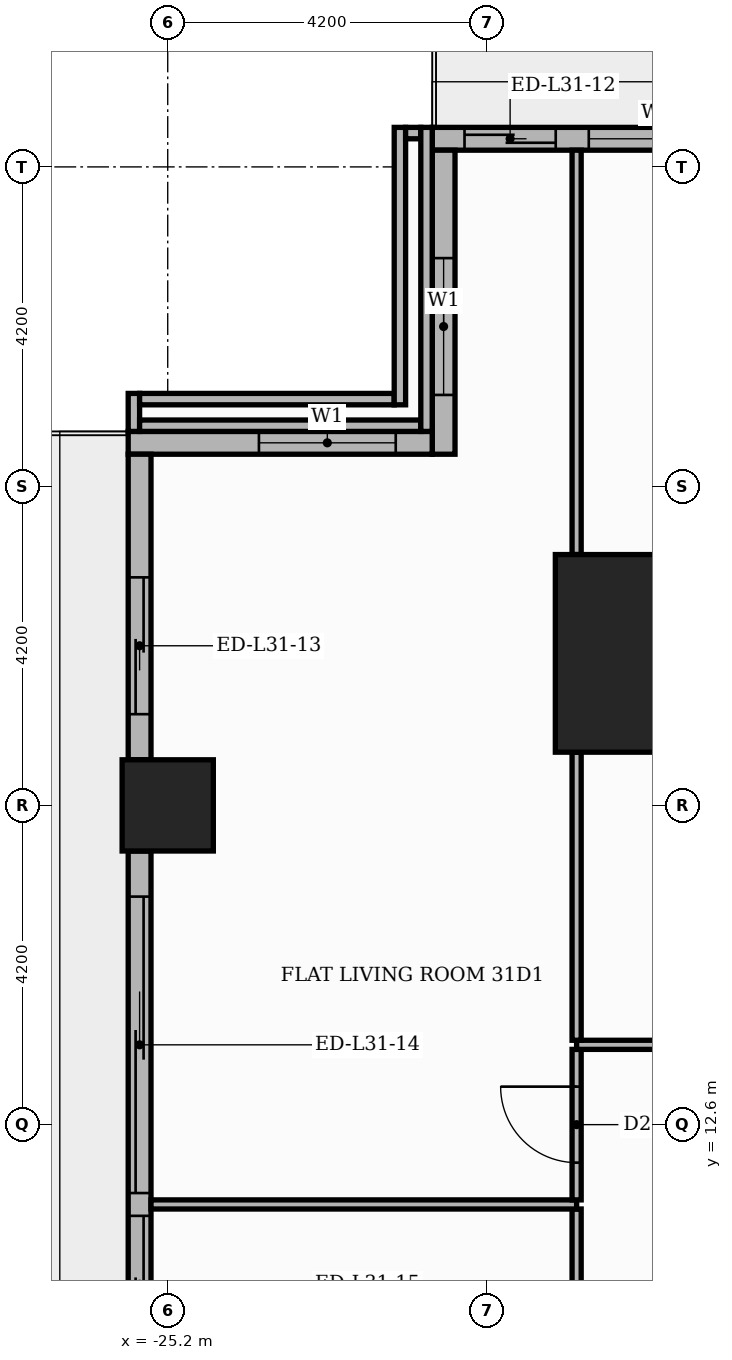
"""IFC4 building model, lengths in metres.
Left out: names, types, materials, properties, quantities, classifications, styles, units other than length and angle.
Written with IfcOpenShell. Run it as: python <this file> out.ifc"""

import sys

from ifc_helpers import new_model, si_unit, direction, frame, frame_2d, origin, origin_2d, place, context, subcontext, project, spatial, rectangle, extrude, element, fill, save


model = new_model("IFC4")
c1 = context("Model", 3, precision=1e-05, world=origin(), true_north=direction((0.0, 1.0)))
c2 = subcontext(c1, "Body", "Model", "MODEL_VIEW")
j1 = project(units=[si_unit("LENGTHUNIT", "METRE"), si_unit("PLANEANGLEUNIT", "RADIAN")], contexts=[c1])
p1 = place(None, origin())
s1 = spatial("IfcSite", under=j1, at=p1, CompositionType="ELEMENT")
p2 = place(p1, origin())
s2 = spatial("IfcBuilding", under=s1, at=p2, CompositionType="ELEMENT")
p3 = place(p2, frame((0.0, 0.0, 133.8)))
s3 = spatial("IfcBuildingStorey", under=s2, at=p3, CompositionType="ELEMENT", Elevation=133.8)
p4 = place(p3, frame((-18.8, 18.8, 0.0), z_axis=(0.0, 0.0, 1.0), x_axis=(1.0, 0.0, 0.0)))
e1 = element("IfcColumn", 1, at=p4, inside=s3, PredefinedType="COLUMN", context=c2, shape_type="SweptSolid", body=[
    extrude(rectangle(XDim=2.6, YDim=2.6, at=origin_2d()), origin(), (0.0, 0.0, 1.0), 3.9),
])
p5 = place(p3, frame((-25.2, 16.8, 0.0), z_axis=(0.0, 0.0, 1.0), x_axis=(1.0, 0.0, 0.0)))
e2 = element("IfcColumn", 2, at=p5, inside=s3, PredefinedType="COLUMN", context=c2, shape_type="SweptSolid", body=[
    extrude(rectangle(XDim=1.2, YDim=1.2, at=origin_2d()), origin(), (0.0, 0.0, 1.0), 3.9),
])
p6 = place(p3, frame((-17.4, 25.57, 0.0), z_axis=(0.0, 0.0, 1.0), x_axis=(-1.0, 0.0, 0.0)))
e3 = element("IfcWall", 3, at=p6, inside=s3, PredefinedType="STANDARD", context=c2, shape_type="SweptSolid", body=[
    extrude(rectangle(XDim=4.32, YDim=0.3, at=frame_2d((2.16, 0.0))), origin(), (0.0, 0.0, 1.0), 3.48),
])
p7 = place(p6, frame((2.695, 0.0, 0.0)))
e4 = element("IfcOpeningElement", 4, at=p7, cuts=e3, PredefinedType="OPENING", context=c2, shape_type="SweptSolid", body=[
    extrude(rectangle(XDim=1.2, YDim=2.4, at=frame_2d((0.6, 1.2))), frame((0.0, 0.16, 0.0), z_axis=(0.0, -1.0, 0.0), x_axis=(1.0, 0.0, 0.0)), (0.0, 0.0, 1.0), 0.32),
])
p8 = place(p6, frame((0.46, 0.0, 0.9)))
e5 = element("IfcOpeningElement", 5, at=p8, cuts=e3, PredefinedType="OPENING", context=c2, shape_type="SweptSolid", body=[
    extrude(rectangle(XDim=1.8, YDim=2.1, at=frame_2d((0.9, 1.05))), frame((0.0, 0.16, 0.0), z_axis=(0.0, -1.0, 0.0), x_axis=(1.0, 0.0, 0.0)), (0.0, 0.0, 1.0), 0.32),
])
p9 = place(p3, frame((-21.57, 25.42, 0.0), z_axis=(0.0, 0.0, 1.0), x_axis=(0.0, -1.0, 0.0)))
e6 = element("IfcWall", 6, at=p9, inside=s3, PredefinedType="STANDARD", context=c2, shape_type="SweptSolid", body=[
    extrude(rectangle(XDim=4.0, YDim=0.3, at=frame_2d((2.0, 0.0))), origin(), (0.0, 0.0, 1.0), 3.48),
])
p10 = place(p9, frame((1.42, 0.0, 0.9)))
e7 = element("IfcOpeningElement", 7, at=p10, cuts=e6, PredefinedType="OPENING", context=c2, shape_type="SweptSolid", body=[
    extrude(rectangle(XDim=1.8, YDim=2.1, at=frame_2d((0.9, 1.05))), frame((0.0, 0.16, 0.0), z_axis=(0.0, -1.0, 0.0), x_axis=(1.0, 0.0, 0.0)), (0.0, 0.0, 1.0), 0.32),
])
p11 = place(p3, frame((-21.72, 21.57, 0.0), z_axis=(0.0, 0.0, 1.0), x_axis=(-1.0, 0.0, 0.0)))
e8 = element("IfcWall", 8, at=p11, inside=s3, PredefinedType="STANDARD", context=c2, shape_type="SweptSolid", body=[
    extrude(rectangle(XDim=4.0, YDim=0.3, at=frame_2d((2.0, 0.0))), origin(), (0.0, 0.0, 1.0), 3.48),
])
p12 = place(p11, frame((0.48, 0.0, 0.9)))
e9 = element("IfcOpeningElement", 9, at=p12, cuts=e8, PredefinedType="OPENING", context=c2, shape_type="SweptSolid", body=[
    extrude(rectangle(XDim=1.8, YDim=2.1, at=frame_2d((0.9, 1.05))), frame((0.0, 0.16, 0.0), z_axis=(0.0, -1.0, 0.0), x_axis=(1.0, 0.0, 0.0)), (0.0, 0.0, 1.0), 0.32),
])
p13 = place(p3, frame((-25.57, 21.42, 0.0), z_axis=(0.0, 0.0, 1.0), x_axis=(0.0, -1.0, 0.0)))
e10 = element("IfcWall", 10, at=p13, inside=s3, PredefinedType="STANDARD", context=c2, shape_type="SweptSolid", body=[
    extrude(rectangle(XDim=4.02, YDim=0.3, at=frame_2d((2.01, 0.0))), origin(), (0.0, 0.0, 1.0), 3.48),
])
p14 = place(p13, frame((1.62, 0.0, 0.0)))
e11 = element("IfcOpeningElement", 11, at=p14, cuts=e10, PredefinedType="OPENING", context=c2, shape_type="SweptSolid", body=[
    extrude(rectangle(XDim=1.8, YDim=2.4, at=frame_2d((0.9, 1.2))), frame((0.0, 0.16, 0.0), z_axis=(0.0, -1.0, 0.0), x_axis=(1.0, 0.0, 0.0)), (0.0, 0.0, 1.0), 0.32),
])
p15 = place(p3, frame((-25.57, 16.2, 0.0), z_axis=(0.0, 0.0, 1.0), x_axis=(0.0, -1.0, 0.0)))
e12 = element("IfcWall", 12, at=p15, inside=s3, PredefinedType="STANDARD", context=c2, shape_type="SweptSolid", body=[
    extrude(rectangle(XDim=7.2, YDim=0.3, at=frame_2d((3.6, 0.0))), origin(), (0.0, 0.0, 1.0), 3.48),
])
p16 = place(p15, frame((0.6, 0.0, 0.0)))
e13 = element("IfcOpeningElement", 13, at=p16, cuts=e12, PredefinedType="OPENING", context=c2, shape_type="SweptSolid", body=[
    extrude(rectangle(XDim=3.9, YDim=2.4, at=frame_2d((1.95, 1.2))), frame((0.0, 0.16, 0.0), z_axis=(0.0, -1.0, 0.0), x_axis=(1.0, 0.0, 0.0)), (0.0, 0.0, 1.0), 0.32),
])
p17 = place(p15, frame((4.8, 0.0, 0.0)))
e14 = element("IfcOpeningElement", 14, at=p17, cuts=e12, PredefinedType="OPENING", context=c2, shape_type="SweptSolid", body=[
    extrude(rectangle(XDim=1.8, YDim=2.4, at=frame_2d((0.9, 1.2))), frame((0.0, 0.16, 0.0), z_axis=(0.0, -1.0, 0.0), x_axis=(1.0, 0.0, 0.0)), (0.0, 0.0, 1.0), 0.32),
])
p18 = place(p3, frame((-25.645, 21.72, 0.0), z_axis=(0.0, 0.0, 1.0), x_axis=(0.0, 1.0, 0.0)))
e15 = element("IfcWall", 15, at=p18, inside=s3, PredefinedType="PARAPET", context=c2, shape_type="SweptSolid", body=[
    extrude(rectangle(XDim=0.5, YDim=0.15, at=frame_2d((0.25, 0.0))), origin(), (0.0, 0.0, 1.0), 1.1),
])
p19 = place(p3, frame((-25.57, 22.145, 0.0), z_axis=(0.0, 0.0, 1.0), x_axis=(1.0, 0.0, 0.0)))
e16 = element("IfcWall", 16, at=p19, inside=s3, PredefinedType="PARAPET", context=c2, shape_type="SweptSolid", body=[
    extrude(rectangle(XDim=3.35, YDim=0.15, at=frame_2d((1.675, 0.0))), origin(), (0.0, 0.0, 1.0), 1.1),
])
p20 = place(p3, frame((-25.57, 21.795, 0.0), z_axis=(0.0, 0.0, 1.0), x_axis=(1.0, 0.0, 0.0)))
e17 = element("IfcWall", 17, at=p20, inside=s3, PredefinedType="PARAPET", context=c2, shape_type="SweptSolid", body=[
    extrude(rectangle(XDim=3.7, YDim=0.15, at=frame_2d((1.85, 0.0))), origin(), (0.0, 0.0, 1.0), 1.1),
])
p21 = place(p3, frame((-22.145, 22.07, 0.0), z_axis=(0.0, 0.0, 1.0), x_axis=(0.0, 1.0, 0.0)))
e18 = element("IfcWall", 18, at=p21, inside=s3, PredefinedType="PARAPET", context=c2, shape_type="SweptSolid", body=[
    extrude(rectangle(XDim=3.65, YDim=0.15, at=frame_2d((1.825, 0.0))), origin(), (0.0, 0.0, 1.0), 1.1),
])
p22 = place(p3, frame((-22.07, 25.645, 0.0), z_axis=(0.0, 0.0, 1.0), x_axis=(1.0, 0.0, 0.0)))
e19 = element("IfcWall", 19, at=p22, inside=s3, PredefinedType="PARAPET", context=c2, shape_type="SweptSolid", body=[
    extrude(rectangle(XDim=0.2, YDim=0.15, at=frame_2d((0.1, 0.0))), origin(), (0.0, 0.0, 1.0), 1.1),
])
p23 = place(p3, frame((-21.795, 21.72, 0.0), z_axis=(0.0, 0.0, 1.0), x_axis=(0.0, 1.0, 0.0)))
e20 = element("IfcWall", 20, at=p23, inside=s3, PredefinedType="PARAPET", context=c2, shape_type="SweptSolid", body=[
    extrude(rectangle(XDim=4.0, YDim=0.15, at=frame_2d((2.0, 0.0))), origin(), (0.0, 0.0, 1.0), 1.1),
])
p24 = place(p3, frame((-19.82, 3.21, 0.0), z_axis=(0.0, 0.0, 1.0), x_axis=(0.0, 1.0, 0.0)))
e21 = element("IfcWall", 21, at=p24, inside=s3, PredefinedType="PARTITIONING", context=c2, shape_type="SweptSolid", body=[
    extrude(rectangle(XDim=8.28, YDim=0.12, at=frame_2d((4.14, 0.0))), origin(), (0.0, 0.0, 1.0), 3.48),
])
p25 = place(p24, frame((3.64, 0.0, 0.0)))
e22 = element("IfcOpeningElement", 22, at=p25, cuts=e21, PredefinedType="OPENING", context=c2, shape_type="SweptSolid", body=[
    extrude(rectangle(XDim=1.0, YDim=2.1, at=frame_2d((0.5, 1.05))), frame((0.0, 0.07, 0.0), z_axis=(0.0, -1.0, 0.0), x_axis=(1.0, 0.0, 0.0)), (0.0, 0.0, 1.0), 0.14),
])
p26 = place(p3, frame((-25.42, 11.55, 0.0), z_axis=(0.0, 0.0, 1.0), x_axis=(1.0, 0.0, 0.0)))
e23 = element("IfcWall", 23, at=p26, inside=s3, PredefinedType="PARTITIONING", context=c2, shape_type="SweptSolid", body=[
    extrude(rectangle(XDim=5.6, YDim=0.12, at=frame_2d((2.8, 0.0))), origin(), (0.0, 0.0, 1.0), 3.48),
])
p27 = place(p3, frame((-19.82, 11.61, 0.0), z_axis=(0.0, 0.0, 1.0), x_axis=(0.0, 1.0, 0.0)))
e24 = element("IfcWall", 24, at=p27, inside=s3, PredefinedType="PARTITIONING", context=c2, shape_type="SweptSolid", body=[
    extrude(rectangle(XDim=1.98, YDim=0.12, at=frame_2d((0.99, 0.0))), origin(), (0.0, 0.0, 1.0), 3.48),
])
p28 = place(p27, frame((0.49, 0.0, 0.0)))
e25 = element("IfcOpeningElement", 25, at=p28, cuts=e24, PredefinedType="OPENING", context=c2, shape_type="SweptSolid", body=[
    extrude(rectangle(XDim=1.0, YDim=2.1, at=frame_2d((0.5, 1.05))), frame((0.0, 0.07, 0.0), z_axis=(0.0, -1.0, 0.0), x_axis=(1.0, 0.0, 0.0)), (0.0, 0.0, 1.0), 0.14),
])
p29 = place(p3, frame((-19.82, 13.65, 0.0), z_axis=(0.0, 0.0, 1.0), x_axis=(1.0, 0.0, 0.0)))
e26 = element("IfcWall", 26, at=p29, inside=s3, PredefinedType="PARTITIONING", context=c2, shape_type="SweptSolid", body=[
    extrude(rectangle(XDim=6.17, YDim=0.12, at=frame_2d((3.085, 0.0))), origin(), (0.0, 0.0, 1.0), 3.48),
])
p30 = place(p29, frame((2.635, 0.0, 0.0)))
e27 = element("IfcOpeningElement", 27, at=p30, cuts=e26, PredefinedType="OPENING", context=c2, shape_type="SweptSolid", body=[
    extrude(rectangle(XDim=0.9, YDim=2.1, at=frame_2d((0.45, 1.05))), frame((0.0, 0.07, 0.0), z_axis=(0.0, -1.0, 0.0), x_axis=(1.0, 0.0, 0.0)), (0.0, 0.0, 1.0), 0.14),
])
p31 = place(p3, frame((-19.82, 13.71, 0.0), z_axis=(0.0, 0.0, 1.0), x_axis=(0.0, 1.0, 0.0)))
e28 = element("IfcWall", 28, at=p31, inside=s3, PredefinedType="PARTITIONING", context=c2, shape_type="SweptSolid", body=[
    extrude(rectangle(XDim=3.79, YDim=0.12, at=frame_2d((1.895, 0.0))), origin(), (0.0, 0.0, 1.0), 3.48),
])
p32 = place(p3, frame((-19.82, 20.1, 0.0), z_axis=(0.0, 0.0, 1.0), x_axis=(0.0, 1.0, 0.0)))
e29 = element("IfcWall", 29, at=p32, inside=s3, PredefinedType="PARTITIONING", context=c2, shape_type="SweptSolid", body=[
    extrude(rectangle(XDim=5.32, YDim=0.12, at=frame_2d((2.66, 0.0))), origin(), (0.0, 0.0, 1.0), 3.48),
])
p33 = place(p7, origin())
e30 = element("IfcDoor", 30, at=p33, inside=s3, OperationType="SLIDING_TO_LEFT", PredefinedType="DOOR", context=c2, shape_type="SweptSolid", body=[
    extrude(rectangle(XDim=1.2, YDim=2.4, at=frame_2d((0.6, 1.2))), frame((0.0, 0.025, 0.0), z_axis=(0.0, -1.0, 0.0), x_axis=(1.0, 0.0, 0.0)), (0.0, 0.0, 1.0), 0.05),
])
fill(e4, e30)
p34 = place(p8, origin())
e31 = element("IfcWindow", 31, at=p34, inside=s3, PartitioningType="SINGLE_PANEL", PredefinedType="WINDOW", context=c2, shape_type="SweptSolid", body=[
    extrude(rectangle(XDim=1.8, YDim=2.1, at=frame_2d((0.9, 1.05))), frame((0.0, 0.03, 0.0), z_axis=(0.0, -1.0, 0.0), x_axis=(1.0, 0.0, 0.0)), (0.0, 0.0, 1.0), 0.06),
])
fill(e5, e31)
p35 = place(p10, origin())
e32 = element("IfcWindow", 32, at=p35, inside=s3, PartitioningType="SINGLE_PANEL", PredefinedType="WINDOW", context=c2, shape_type="SweptSolid", body=[
    extrude(rectangle(XDim=1.8, YDim=2.1, at=frame_2d((0.9, 1.05))), frame((0.0, 0.03, 0.0), z_axis=(0.0, -1.0, 0.0), x_axis=(1.0, 0.0, 0.0)), (0.0, 0.0, 1.0), 0.06),
])
fill(e7, e32)
p36 = place(p12, origin())
e33 = element("IfcWindow", 33, at=p36, inside=s3, PartitioningType="SINGLE_PANEL", PredefinedType="WINDOW", context=c2, shape_type="SweptSolid", body=[
    extrude(rectangle(XDim=1.8, YDim=2.1, at=frame_2d((0.9, 1.05))), frame((0.0, 0.03, 0.0), z_axis=(0.0, -1.0, 0.0), x_axis=(1.0, 0.0, 0.0)), (0.0, 0.0, 1.0), 0.06),
])
fill(e9, e33)
p37 = place(p14, origin())
e34 = element("IfcDoor", 34, at=p37, inside=s3, OperationType="SLIDING_TO_RIGHT", PredefinedType="DOOR", context=c2, shape_type="SweptSolid", body=[
    extrude(rectangle(XDim=1.8, YDim=2.4, at=frame_2d((0.9, 1.2))), frame((0.0, 0.025, 0.0), z_axis=(0.0, -1.0, 0.0), x_axis=(1.0, 0.0, 0.0)), (0.0, 0.0, 1.0), 0.05),
])
fill(e11, e34)
p38 = place(p16, origin())
e35 = element("IfcDoor", 35, at=p38, inside=s3, OperationType="SLIDING_TO_LEFT", PredefinedType="DOOR", context=c2, shape_type="SweptSolid", body=[
    extrude(rectangle(XDim=3.9, YDim=2.4, at=frame_2d((1.95, 1.2))), frame((0.0, 0.025, 0.0), z_axis=(0.0, -1.0, 0.0), x_axis=(1.0, 0.0, 0.0)), (0.0, 0.0, 1.0), 0.05),
])
fill(e13, e35)
p39 = place(p17, origin())
e36 = element("IfcDoor", 36, at=p39, inside=s3, OperationType="SLIDING_TO_RIGHT", PredefinedType="DOOR", context=c2, shape_type="SweptSolid", body=[
    extrude(rectangle(XDim=1.8, YDim=2.4, at=frame_2d((0.9, 1.2))), frame((0.0, 0.025, 0.0), z_axis=(0.0, -1.0, 0.0), x_axis=(1.0, 0.0, 0.0)), (0.0, 0.0, 1.0), 0.05),
])
fill(e14, e36)
p40 = place(p28, origin())
e37 = element("IfcDoor", 37, at=p40, inside=s3, OperationType="SINGLE_SWING_RIGHT", PredefinedType="DOOR", context=c2, shape_type="SweptSolid", body=[
    extrude(rectangle(XDim=1.0, YDim=2.1, at=frame_2d((0.5, 1.05))), frame((0.0, 0.025, 0.0), z_axis=(0.0, -1.0, 0.0), x_axis=(1.0, 0.0, 0.0)), (0.0, 0.0, 1.0), 0.05),
])
fill(e25, e37)
save(model, sys.argv[1])
